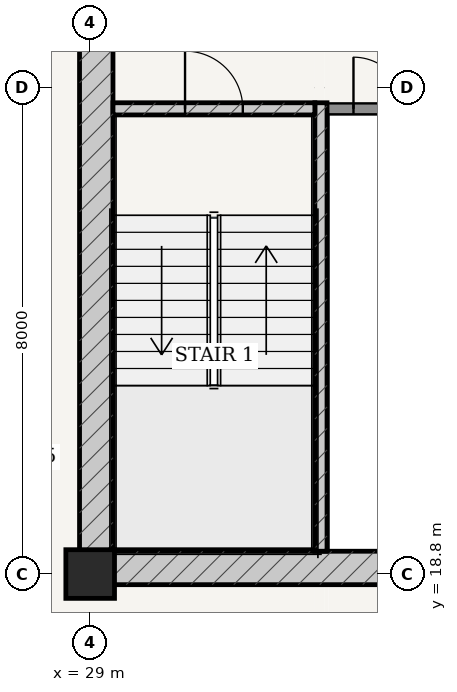
"""IFC4 building model, lengths in metres.
Left out: names, types, materials, properties, quantities, classifications, styles, units other than length and angle.
Written with IfcOpenShell. Run it as: python <this file> out.ifc"""

import sys

from ifc_helpers import new_model, si_unit, direction, frame, frame_2d, origin, origin_2d, place, context, subcontext, project, spatial, rectangle, extrude, source, transform, mapped, element, fill, save


model = new_model("IFC4")
c1 = context("Model", 3, precision=1e-05, world=origin(), true_north=direction((-0.2419218956, 0.970295726276)))
c2 = subcontext(c1, "Body", "Model", "MODEL_VIEW")
j1 = project(units=[si_unit("LENGTHUNIT", "METRE"), si_unit("PLANEANGLEUNIT", "RADIAN")], contexts=[c1])
p1 = place(None, origin())
s1 = spatial("IfcSite", under=j1, at=p1, CompositionType="ELEMENT")
p2 = place(p1, origin())
s2 = spatial("IfcBuilding", under=s1, at=p2, CompositionType="ELEMENT")
p3 = place(p2, frame((0.0, 0.0, 289.45)))
s3 = spatial("IfcBuildingStorey", under=s2, at=p3, CompositionType="ELEMENT", Elevation=289.45)
p4 = place(p3, frame((29.0, 18.8, 0.0), z_axis=(0.0, 0.0, 1.0), x_axis=(1.0, 0.0, 0.0)))
e1 = element("IfcColumn", 1, at=p4, inside=s3, PredefinedType="COLUMN", context=c2, shape_type="SweptSolid", body=[
    extrude(rectangle(XDim=0.8, YDim=0.8, at=origin_2d()), origin(), (0.0, 0.0, 1.0), 3.75),
])
p5 = place(p3, frame((28.825, 18.9, 0.0), z_axis=(0.0, 0.0, 1.0), x_axis=(1.0, 0.0, 0.0)))
e2 = element("IfcWall", 2, at=p5, inside=s3, PredefinedType="SHEAR", context=c2, shape_type="SweptSolid", body=[
    extrude(rectangle(XDim=18.35, YDim=0.55, at=frame_2d((9.175, 0.0))), origin(), (0.0, 0.0, 1.0), 3.49),
])
p6 = place(p5, frame((7.41, 0.0, 0.0)))
e3 = element("IfcOpeningElement", 3, at=p6, cuts=e2, PredefinedType="OPENING", context=c2, shape_type="SweptSolid", body=[
    extrude(rectangle(XDim=0.85, YDim=2.1, at=frame_2d((0.425, 1.05))), frame((0.0, 0.285, 0.0), z_axis=(0.0, -1.0, 0.0), x_axis=(1.0, 0.0, 0.0)), (0.0, 0.0, 1.0), 0.57),
])
p7 = place(p5, frame((10.49, 0.0, 0.0)))
e4 = element("IfcOpeningElement", 4, at=p7, cuts=e2, PredefinedType="OPENING", context=c2, shape_type="SweptSolid", body=[
    extrude(rectangle(XDim=0.85, YDim=2.1, at=frame_2d((0.425, 1.05))), frame((0.0, 0.285, 0.0), z_axis=(0.0, -1.0, 0.0), x_axis=(1.0, 0.0, 0.0)), (0.0, 0.0, 1.0), 0.57),
])
p8 = place(p3, frame((29.1, 19.175, 0.0), z_axis=(0.0, 0.0, 1.0), x_axis=(0.0, 1.0, 0.0)))
e5 = element("IfcWall", 5, at=p8, inside=s3, PredefinedType="SHEAR", context=c2, shape_type="SweptSolid", body=[
    extrude(rectangle(XDim=15.25, YDim=0.55, at=frame_2d((7.625, 0.0))), origin(), (0.0, 0.0, 1.0), 3.49),
])
p9 = place(p8, frame((9.875, 0.0, 0.0)))
e6 = element("IfcOpeningElement", 6, at=p9, cuts=e5, PredefinedType="OPENING", context=c2, shape_type="SweptSolid", body=[
    extrude(rectangle(XDim=1.5, YDim=2.2, at=frame_2d((0.75, 1.1))), frame((0.0, 0.285, 0.0), z_axis=(0.0, -1.0, 0.0), x_axis=(1.0, 0.0, 0.0)), (0.0, 0.0, 1.0), 0.57),
])
p10 = place(p3, frame((32.795, 19.175, 0.0), z_axis=(0.0, 0.0, 1.0), x_axis=(0.0, 1.0, 0.0)))
e7 = element("IfcWall", 7, at=p10, inside=s3, PredefinedType="SOLIDWALL", context=c2, shape_type="SweptSolid", body=[
    extrude(rectangle(XDim=7.375, YDim=0.2, at=frame_2d((3.688, 0.0))), origin(), (0.0, 0.0, 1.0), 3.49),
])
p11 = place(p3, frame((29.375, 26.45, 0.0), z_axis=(0.0, 0.0, 1.0), x_axis=(1.0, 0.0, 0.0)))
e8 = element("IfcWall", 8, at=p11, inside=s3, PredefinedType="SOLIDWALL", context=c2, shape_type="SweptSolid", body=[
    extrude(rectangle(XDim=3.32, YDim=0.2, at=frame_2d((1.66, 0.0))), origin(), (0.0, 0.0, 1.0), 3.49),
])
p12 = place(p11, frame((1.185, 0.0, 0.0)))
e9 = element("IfcOpeningElement", 9, at=p12, cuts=e8, PredefinedType="OPENING", context=c2, shape_type="SweptSolid", body=[
    extrude(rectangle(XDim=0.95, YDim=2.15, at=frame_2d((0.475, 1.075))), frame((0.0, 0.11, 0.0), z_axis=(0.0, -1.0, 0.0), x_axis=(1.0, 0.0, 0.0)), (0.0, 0.0, 1.0), 0.22),
])
p13 = place(p3, frame((32.9, 26.45, 0.0), z_axis=(0.0, 0.0, 1.0), x_axis=(1.0, 0.0, 0.0)))
e10 = element("IfcWall", 10, at=p13, inside=s3, PredefinedType="PARTITIONING", context=c2, shape_type="SweptSolid", body=[
    extrude(rectangle(XDim=1.71, YDim=0.18, at=frame_2d((0.855, 0.0))), origin(), (0.0, 0.0, 1.0), 3.49),
])
p14 = place(p13, frame((0.43, 0.0, 0.0)))
e11 = element("IfcOpeningElement", 11, at=p14, cuts=e10, PredefinedType="OPENING", context=c2, shape_type="SweptSolid", body=[
    extrude(rectangle(XDim=0.85, YDim=2.1, at=frame_2d((0.425, 1.05))), frame((0.0, 0.1, 0.0), z_axis=(0.0, -1.0, 0.0), x_axis=(1.0, 0.0, 0.0)), (0.0, 0.0, 1.0), 0.2),
])
m1 = source(origin(), c2, "Body", "SweptSolid", [
    extrude(rectangle(XDim=0.95, YDim=2.15, at=frame_2d((0.475, 1.075))), frame((0.0, 0.025, 0.0), z_axis=(0.0, -1.0, 0.0), x_axis=(1.0, 0.0, 0.0)), (0.0, 0.0, 1.0), 0.05),
])
p15 = place(p12, origin())
e12 = element("IfcDoor", 12, at=p15, inside=s3, OperationType="SINGLE_SWING_LEFT", PredefinedType="DOOR", context=c2, shape_type="MappedRepresentation", body=[
    mapped(m1, transform((0.0, 0.0, 0.0), scale=1.0)),
])
fill(e9, e12)
m2 = source(origin(), c2, "Body", "SweptSolid", [
    extrude(rectangle(XDim=0.85, YDim=2.1, at=frame_2d((0.425, 1.05))), frame((0.0, 0.025, 0.0), z_axis=(0.0, -1.0, 0.0), x_axis=(1.0, 0.0, 0.0)), (0.0, 0.0, 1.0), 0.05),
])
p16 = place(p14, origin())
e13 = element("IfcDoor", 13, at=p16, inside=s3, OperationType="SINGLE_SWING_LEFT", PredefinedType="DOOR", context=c2, shape_type="MappedRepresentation", body=[
    mapped(m2, transform((0.0, 0.0, 0.0), scale=1.0)),
])
fill(e11, e13)
save(model, sys.argv[1])
